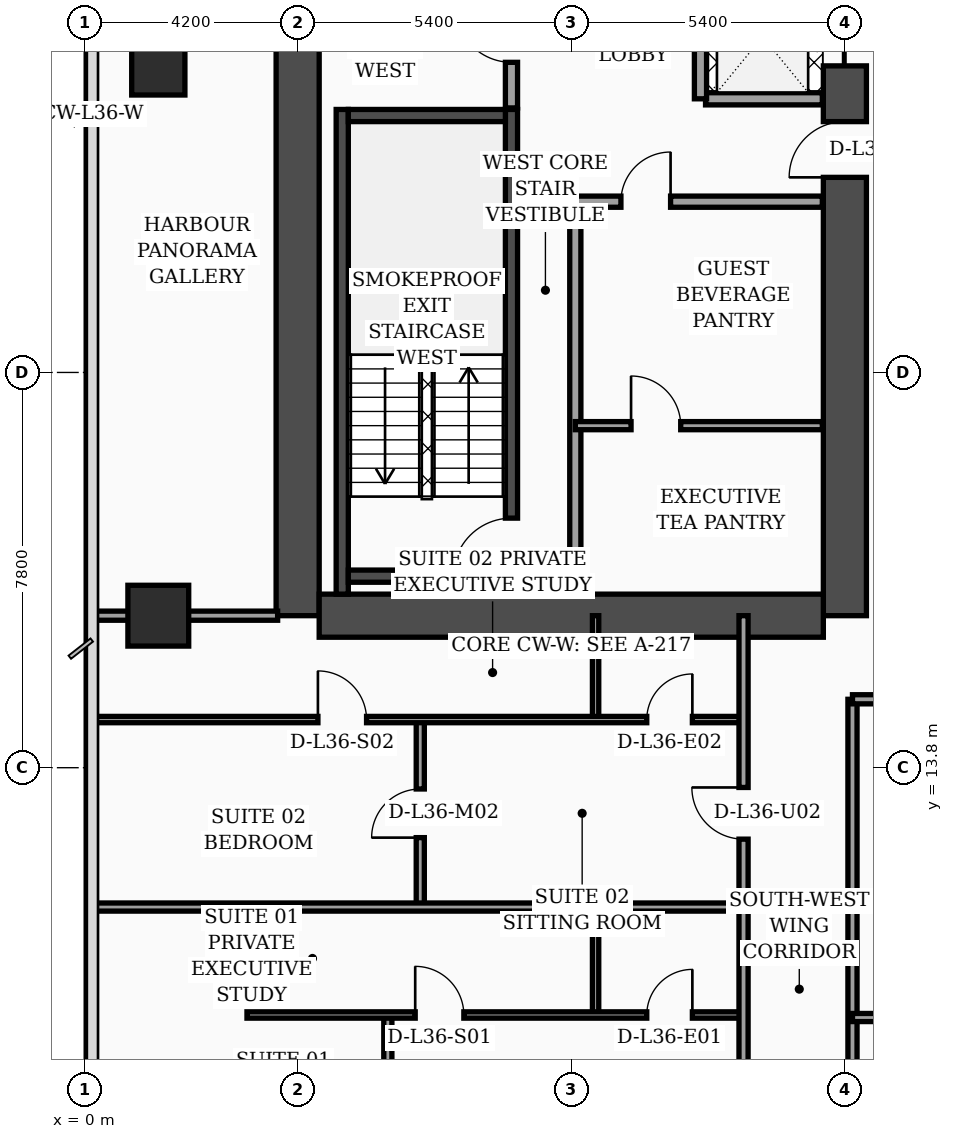
"""IFC4 building model, lengths in metres.
Left out: names, types, materials, properties, quantities, classifications, styles, units other than length and angle.
Written with IfcOpenShell. Run it as: python <this file> out.ifc"""

import sys

from ifc_helpers import new_model, si_unit, direction, frame, frame_2d, origin, origin_2d, place, context, subcontext, project, spatial, rectangle, extrude, element, fill, save


model = new_model("IFC4")
c1 = context("Model", 3, precision=1e-05, world=origin(), true_north=direction((0.0, 1.0)))
c2 = subcontext(c1, "Body", "Model", "MODEL_VIEW")
j1 = project(units=[si_unit("LENGTHUNIT", "METRE"), si_unit("PLANEANGLEUNIT", "RADIAN")], contexts=[c1])
p1 = place(None, origin())
s1 = spatial("IfcSite", under=j1, at=p1, CompositionType="ELEMENT")
p2 = place(p1, origin())
s2 = spatial("IfcBuilding", under=s1, at=p2, CompositionType="ELEMENT")
p3 = place(p2, frame((0.0, 0.0, 148.5)))
s3 = spatial("IfcBuildingStorey", under=s2, at=p3, CompositionType="ELEMENT", Elevation=148.5)
p4 = place(p3, frame((4.2, 16.8, 0.0), z_axis=(0.0, 0.0, 1.0), x_axis=(0.0, 1.0, 0.0)))
e1 = element("IfcWall", 1, at=p4, inside=s3, PredefinedType="SHEAR", context=c2, shape_type="SweptSolid", body=[
    extrude(rectangle(XDim=21.6, YDim=0.85, at=frame_2d((10.8, 0.0))), origin(), (0.0, 0.0, 1.0), 3.56),
])
p5 = place(p3, frame((15.0, 16.8, 0.0), z_axis=(0.0, 0.0, 1.0), x_axis=(0.0, 1.0, 0.0)))
e2 = element("IfcWall", 2, at=p5, inside=s3, PredefinedType="SHEAR", context=c2, shape_type="SweptSolid", body=[
    extrude(rectangle(XDim=21.6, YDim=0.85, at=frame_2d((10.8, 0.0))), origin(), (0.0, 0.0, 1.0), 3.56),
])
p6 = place(p5, frame((8.65, 0.0, 0.0)))
e3 = element("IfcOpeningElement", 3, at=p6, cuts=e2, PredefinedType="OPENING", context=c2, shape_type="SweptSolid", body=[
    extrude(rectangle(XDim=1.1, YDim=2.2, at=frame_2d((0.55, 1.1))), frame((0.0, 0.435, 0.0), z_axis=(0.0, -1.0, 0.0), x_axis=(1.0, 0.0, 0.0)), (0.0, 0.0, 1.0), 0.87),
])
p7 = place(p5, frame((10.85, 0.0, 0.0)))
e4 = element("IfcOpeningElement", 4, at=p7, cuts=e2, PredefinedType="OPENING", context=c2, shape_type="SweptSolid", body=[
    extrude(rectangle(XDim=1.1, YDim=2.2, at=frame_2d((0.55, 1.1))), frame((0.0, 0.435, 0.0), z_axis=(0.0, -1.0, 0.0), x_axis=(1.0, 0.0, 0.0)), (0.0, 0.0, 1.0), 0.87),
])
p8 = place(p5, frame((13.5, 0.0, 0.0)))
e5 = element("IfcOpeningElement", 5, at=p8, cuts=e2, PredefinedType="OPENING", context=c2, shape_type="SweptSolid", body=[
    extrude(rectangle(XDim=1.1, YDim=2.2, at=frame_2d((0.55, 1.1))), frame((0.0, 0.435, 0.0), z_axis=(0.0, -1.0, 0.0), x_axis=(1.0, 0.0, 0.0)), (0.0, 0.0, 1.0), 0.87),
])
p9 = place(p5, frame((16.15, 0.0, 0.0)))
e6 = element("IfcOpeningElement", 6, at=p9, cuts=e2, PredefinedType="OPENING", context=c2, shape_type="SweptSolid", body=[
    extrude(rectangle(XDim=1.1, YDim=2.2, at=frame_2d((0.55, 1.1))), frame((0.0, 0.435, 0.0), z_axis=(0.0, -1.0, 0.0), x_axis=(1.0, 0.0, 0.0)), (0.0, 0.0, 1.0), 0.87),
])
p10 = place(p3, frame((4.625, 16.8, 0.0), z_axis=(0.0, 0.0, 1.0), x_axis=(1.0, 0.0, 0.0)))
e7 = element("IfcWall", 7, at=p10, inside=s3, PredefinedType="SHEAR", context=c2, shape_type="SweptSolid", body=[
    extrude(rectangle(XDim=9.95, YDim=0.85, at=frame_2d((4.975, 0.0))), origin(), (0.0, 0.0, 1.0), 3.56),
])
p11 = place(p3, frame((5.08, 17.225, 0.0), z_axis=(0.0, 0.0, 1.0), x_axis=(0.0, 1.0, 0.0)))
e8 = element("IfcWall", 8, at=p11, inside=s3, PredefinedType="SOLIDWALL", context=c2, shape_type="SweptSolid", body=[
    extrude(rectangle(XDim=9.565, YDim=0.24, at=frame_2d((4.782, 0.0))), origin(), (0.0, 0.0, 1.0), 3.56),
])
p12 = place(p3, frame((8.42, 17.225, 0.0), z_axis=(0.0, 0.0, 1.0), x_axis=(0.0, 1.0, 0.0)))
e9 = element("IfcWall", 9, at=p12, inside=s3, PredefinedType="SOLIDWALL", context=c2, shape_type="SweptSolid", body=[
    extrude(rectangle(XDim=9.565, YDim=0.24, at=frame_2d((4.782, 0.0))), origin(), (0.0, 0.0, 1.0), 3.56),
])
p13 = place(p12, frame((0.35, 0.0, 0.0)))
e10 = element("IfcOpeningElement", 10, at=p13, cuts=e9, PredefinedType="OPENING", context=c2, shape_type="SweptSolid", body=[
    extrude(rectangle(XDim=1.15, YDim=2.2, at=frame_2d((0.575, 1.1))), frame((0.0, 0.13, 0.0), z_axis=(0.0, -1.0, 0.0), x_axis=(1.0, 0.0, 0.0)), (0.0, 0.0, 1.0), 0.26),
])
for number, where, z_axis, x_axis in (
    (11, (5.2, 17.58, 0.0), (0.0, 0.0, 1.0), (1.0, 0.0, 0.0)),
    (12, (5.2, 26.67, 0.0), (0.0, 0.0, 1.0), (1.0, 0.0, 0.0)),
):
    element("IfcWall", number, at=place(p3, frame(where, z_axis=z_axis, x_axis=x_axis)), inside=s3, PredefinedType="SOLIDWALL", context=c2, shape_type="SweptSolid", body=[
        extrude(rectangle(XDim=3.1, YDim=0.24, at=frame_2d((1.55, 0.0))), origin(), (0.0, 0.0, 1.0), 3.56),
    ])
p14 = place(p3, frame((1.45, 16.8, 0.0), z_axis=(0.0, 0.0, 1.0), x_axis=(1.0, 0.0, 0.0)))
e13 = element("IfcColumn", 13, at=p14, inside=s3, PredefinedType="COLUMN", context=c2, shape_type="SweptSolid", body=[
    extrude(rectangle(XDim=1.2, YDim=1.2, at=origin_2d()), origin(), (0.0, 0.0, 1.0), 3.56),
])
p15 = place(p3, frame((1.45, 27.6, 0.0), z_axis=(0.0, 0.0, 1.0), x_axis=(1.0, 0.0, 0.0)))
e14 = element("IfcColumn", 14, at=p15, inside=s3, PredefinedType="COLUMN", context=c2, shape_type="SweptSolid", body=[
    extrude(rectangle(XDim=1.05, YDim=1.05, at=origin_2d()), origin(), (0.0, 0.0, 1.0), 3.56),
])
p16 = place(p3, frame((8.42, 26.82, 0.0), z_axis=(0.0, 0.0, 1.0), x_axis=(0.0, 1.0, 0.0)))
e15 = element("IfcWall", 15, at=p16, inside=s3, PredefinedType="SOLIDWALL", context=c2, shape_type="SweptSolid", body=[
    extrude(rectangle(XDim=3.0, YDim=0.24, at=frame_2d((1.5, 0.0))), origin(), (0.0, 0.0, 1.0), 3.56),
])
p17 = place(p16, frame((0.9, 0.0, 0.0)))
e16 = element("IfcOpeningElement", 16, at=p17, cuts=e15, PredefinedType="OPENING", context=c2, shape_type="SweptSolid", body=[
    extrude(rectangle(XDim=1.1, YDim=2.2, at=frame_2d((0.55, 1.1))), frame((0.0, 0.13, 0.0), z_axis=(0.0, -1.0, 0.0), x_axis=(1.0, 0.0, 0.0)), (0.0, 0.0, 1.0), 0.26),
])
p18 = place(p3, frame((9.68, 17.245, 0.0), z_axis=(0.0, 0.0, 1.0), x_axis=(0.0, 1.0, 0.0)))
e17 = element("IfcWall", 17, at=p18, inside=s3, PredefinedType="SOLIDWALL", context=c2, shape_type="SweptSolid", body=[
    extrude(rectangle(XDim=7.755, YDim=0.22, at=frame_2d((3.877, 0.0))), origin(), (0.0, 0.0, 1.0), 3.56),
])
p19 = place(p3, frame((9.68, 20.55, 0.0), z_axis=(0.0, 0.0, 1.0), x_axis=(1.0, 0.0, 0.0)))
e18 = element("IfcWall", 18, at=p19, inside=s3, PredefinedType="PARTITIONING", context=c2, shape_type="SweptSolid", body=[
    extrude(rectangle(XDim=4.875, YDim=0.16, at=frame_2d((2.438, 0.0))), origin(), (0.0, 0.0, 1.0), 3.56),
])
p20 = place(p19, frame((1.1, 0.0, 0.0)))
e19 = element("IfcOpeningElement", 19, at=p20, cuts=e18, PredefinedType="OPENING", context=c2, shape_type="SweptSolid", body=[
    extrude(rectangle(XDim=0.98, YDim=2.15, at=frame_2d((0.49, 1.075))), frame((0.0, 0.09, 0.0), z_axis=(0.0, -1.0, 0.0), x_axis=(1.0, 0.0, 0.0)), (0.0, 0.0, 1.0), 0.18),
])
p21 = place(p3, frame((9.68, 24.97, 0.0), z_axis=(0.0, 0.0, 1.0), x_axis=(1.0, 0.0, 0.0)))
e20 = element("IfcWall", 20, at=p21, inside=s3, PredefinedType="SOLIDWALL", context=c2, shape_type="SweptSolid", body=[
    extrude(rectangle(XDim=4.875, YDim=0.22, at=frame_2d((2.438, 0.0))), origin(), (0.0, 0.0, 1.0), 2.94),
])
p22 = place(p21, frame((0.9, 0.0, 0.0)))
e21 = element("IfcOpeningElement", 21, at=p22, cuts=e20, PredefinedType="OPENING", context=c2, shape_type="SweptSolid", body=[
    extrude(rectangle(XDim=0.98, YDim=2.15, at=frame_2d((0.49, 1.075))), frame((0.0, 0.12, 0.0), z_axis=(0.0, -1.0, 0.0), x_axis=(1.0, 0.0, 0.0)), (0.0, 0.0, 1.0), 0.24),
])
p23 = place(p3, frame((12.25, 27.0, 0.0), z_axis=(0.0, 0.0, 1.0), x_axis=(1.0, 0.0, 0.0)))
e22 = element("IfcWall", 22, at=p23, inside=s3, PredefinedType="SOLIDWALL", context=c2, shape_type="SweptSolid", body=[
    extrude(rectangle(XDim=2.305, YDim=0.24, at=frame_2d((1.152, 0.0))), origin(), (0.0, 0.0, 1.0), 3.56),
])
p24 = place(p3, frame((12.15, 27.0, 0.0), z_axis=(0.0, 0.0, 1.0), x_axis=(0.0, 1.0, 0.0)))
e23 = element("IfcWall", 23, at=p24, inside=s3, PredefinedType="SOLIDWALL", context=c2, shape_type="SweptSolid", body=[
    extrude(rectangle(XDim=7.75, YDim=0.24, at=frame_2d((3.875, 0.0))), origin(), (0.0, 0.0, 1.0), 3.56),
])
p25 = place(p3, frame((0.08, 16.8, 0.0), z_axis=(0.0, 0.0, 1.0), x_axis=(1.0, 0.0, 0.0)))
e24 = element("IfcWall", 24, at=p25, inside=s3, PredefinedType="PARTITIONING", context=c2, shape_type="SweptSolid", body=[
    extrude(rectangle(XDim=3.725, YDim=0.18, at=frame_2d((1.862, 0.0))), origin(), (0.0, 0.0, 1.0), 2.94),
])
p26 = place(p3, frame((10.08, 8.92, 0.0), z_axis=(0.0, 0.0, 1.0), x_axis=(0.0, 1.0, 0.0)))
e25 = element("IfcWall", 25, at=p26, inside=s3, PredefinedType="PARTITIONING", context=c2, shape_type="SweptSolid", body=[
    extrude(rectangle(XDim=2.13, YDim=0.125, at=frame_2d((1.065, 0.0))), origin(), (0.0, 0.0, 1.0), 3.09),
])
p27 = place(p3, frame((5.98, 2.44, 0.0), z_axis=(0.0, 0.0, 1.0), x_axis=(0.0, 1.0, 0.0)))
e26 = element("IfcWall", 26, at=p27, inside=s3, PredefinedType="PARTITIONING", context=c2, shape_type="SweptSolid", body=[
    extrude(rectangle(XDim=6.48, YDim=0.16, at=frame_2d((3.24, 0.0))), origin(), (0.0, 0.0, 1.0), 3.04),
])
p28 = place(p27, frame((2.76, 0.0, 0.0)))
e27 = element("IfcOpeningElement", 27, at=p28, cuts=e26, PredefinedType="OPENING", context=c2, shape_type="SweptSolid", body=[
    extrude(rectangle(XDim=0.96, YDim=2.2, at=frame_2d((0.48, 1.1))), frame((0.0, 0.09, 0.0), z_axis=(0.0, -1.0, 0.0), x_axis=(1.0, 0.0, 0.0)), (0.0, 0.0, 1.0), 0.18),
])
p29 = place(p3, frame((3.2, 8.92, 0.0), z_axis=(0.0, 0.0, 1.0), x_axis=(1.0, 0.0, 0.0)))
e28 = element("IfcWall", 28, at=p29, inside=s3, PredefinedType="PARTITIONING", context=c2, shape_type="SweptSolid", body=[
    extrude(rectangle(XDim=9.8, YDim=0.125, at=frame_2d((4.9, 0.0))), origin(), (0.0, 0.0, 1.0), 2.94),
])
p30 = place(p29, frame((3.32, 0.0, 0.0)))
e29 = element("IfcOpeningElement", 29, at=p30, cuts=e28, PredefinedType="OPENING", context=c2, shape_type="SweptSolid", body=[
    extrude(rectangle(XDim=0.96, YDim=2.2, at=frame_2d((0.48, 1.1))), frame((0.0, 0.073, 0.0), z_axis=(0.0, -1.0, 0.0), x_axis=(1.0, 0.0, 0.0)), (0.0, 0.0, 1.0), 0.145),
])
p31 = place(p29, frame((7.89, 0.0, 0.0)))
e30 = element("IfcOpeningElement", 30, at=p31, cuts=e28, PredefinedType="OPENING", context=c2, shape_type="SweptSolid", body=[
    extrude(rectangle(XDim=0.9, YDim=2.15, at=frame_2d((0.45, 1.075))), frame((0.0, 0.073, 0.0), z_axis=(0.0, -1.0, 0.0), x_axis=(1.0, 0.0, 0.0)), (0.0, 0.0, 1.0), 0.145),
])
p32 = place(p3, frame((10.08, 14.75, 0.0), z_axis=(0.0, 0.0, 1.0), x_axis=(0.0, 1.0, 0.0)))
e31 = element("IfcWall", 31, at=p32, inside=s3, PredefinedType="PARTITIONING", context=c2, shape_type="SweptSolid", body=[
    extrude(rectangle(XDim=2.05, YDim=0.125, at=frame_2d((1.025, 0.0))), origin(), (0.0, 0.0, 1.0), 3.56),
])
p33 = place(p3, frame((6.62, 11.05, 0.0), z_axis=(0.0, 0.0, 1.0), x_axis=(0.0, 1.0, 0.0)))
e32 = element("IfcWall", 32, at=p33, inside=s3, PredefinedType="PARTITIONING", context=c2, shape_type="SweptSolid", body=[
    extrude(rectangle(XDim=3.7, YDim=0.16, at=frame_2d((1.85, 0.0))), origin(), (0.0, 0.0, 1.0), 3.56),
])
p34 = place(p33, frame((1.37, 0.0, 0.0)))
e33 = element("IfcOpeningElement", 33, at=p34, cuts=e32, PredefinedType="OPENING", context=c2, shape_type="SweptSolid", body=[
    extrude(rectangle(XDim=0.96, YDim=2.2, at=frame_2d((0.48, 1.1))), frame((0.0, 0.09, 0.0), z_axis=(0.0, -1.0, 0.0), x_axis=(1.0, 0.0, 0.0)), (0.0, 0.0, 1.0), 0.18),
])
p35 = place(p3, frame((0.08, 14.75, 0.0), z_axis=(0.0, 0.0, 1.0), x_axis=(1.0, 0.0, 0.0)))
e34 = element("IfcWall", 34, at=p35, inside=s3, PredefinedType="PARTITIONING", context=c2, shape_type="SweptSolid", body=[
    extrude(rectangle(XDim=12.92, YDim=0.125, at=frame_2d((6.46, 0.0))), origin(), (0.0, 0.0, 1.0), 2.94),
])
p36 = place(p35, frame((4.52, 0.0, 0.0)))
e35 = element("IfcOpeningElement", 35, at=p36, cuts=e34, PredefinedType="OPENING", context=c2, shape_type="SweptSolid", body=[
    extrude(rectangle(XDim=0.96, YDim=2.2, at=frame_2d((0.48, 1.1))), frame((0.0, 0.073, 0.0), z_axis=(0.0, -1.0, 0.0), x_axis=(1.0, 0.0, 0.0)), (0.0, 0.0, 1.0), 0.145),
])
p37 = place(p35, frame((11.01, 0.0, 0.0)))
e36 = element("IfcOpeningElement", 36, at=p37, cuts=e34, PredefinedType="OPENING", context=c2, shape_type="SweptSolid", body=[
    extrude(rectangle(XDim=0.9, YDim=2.15, at=frame_2d((0.45, 1.075))), frame((0.0, 0.073, 0.0), z_axis=(0.0, -1.0, 0.0), x_axis=(1.0, 0.0, 0.0)), (0.0, 0.0, 1.0), 0.145),
])
p38 = place(p3, frame((0.08, 11.05, 0.0), z_axis=(0.0, 0.0, 1.0), x_axis=(1.0, 0.0, 0.0)))
e37 = element("IfcWall", 37, at=p38, inside=s3, PredefinedType="PARTITIONING", context=c2, shape_type="SweptSolid", body=[
    extrude(rectangle(XDim=12.92, YDim=0.16, at=frame_2d((6.46, 0.0))), origin(), (0.0, 0.0, 1.0), 2.94),
])
p39 = place(p3, frame((13.0, 2.44, 0.0), z_axis=(0.0, 0.0, 1.0), x_axis=(0.0, 1.0, 0.0)))
e38 = element("IfcWall", 38, at=p39, inside=s3, PredefinedType="PARTITIONING", context=c2, shape_type="SweptSolid", body=[
    extrude(rectangle(XDim=14.36, YDim=0.18, at=frame_2d((7.18, 0.0))), origin(), (0.0, 0.0, 1.0), 2.94),
])
p40 = place(p39, frame((3.01, 0.0, 0.0)))
e39 = element("IfcOpeningElement", 39, at=p40, cuts=e38, PredefinedType="OPENING", context=c2, shape_type="SweptSolid", body=[
    extrude(rectangle(XDim=1.02, YDim=2.2, at=frame_2d((0.51, 1.1))), frame((0.0, 0.1, 0.0), z_axis=(0.0, -1.0, 0.0), x_axis=(1.0, 0.0, 0.0)), (0.0, 0.0, 1.0), 0.2),
])
p41 = place(p39, frame((9.95, 0.0, 0.0)))
e40 = element("IfcOpeningElement", 40, at=p41, cuts=e38, PredefinedType="OPENING", context=c2, shape_type="SweptSolid", body=[
    extrude(rectangle(XDim=1.02, YDim=2.2, at=frame_2d((0.51, 1.1))), frame((0.0, 0.1, 0.0), z_axis=(0.0, -1.0, 0.0), x_axis=(1.0, 0.0, 0.0)), (0.0, 0.0, 1.0), 0.2),
])
p42 = place(p3, frame((15.15, 2.44, 0.0), z_axis=(0.0, 0.0, 1.0), x_axis=(0.0, 1.0, 0.0)))
e41 = element("IfcWall", 41, at=p42, inside=s3, PredefinedType="PARTITIONING", context=c2, shape_type="SweptSolid", body=[
    extrude(rectangle(XDim=12.71, YDim=0.18, at=frame_2d((6.355, 0.0))), origin(), (0.0, 0.0, 1.0), 3.04),
])
p43 = place(p3, frame((15.15, 8.87, 0.0), z_axis=(0.0, 0.0, 1.0), x_axis=(1.0, 0.0, 0.0)))
e42 = element("IfcWall", 42, at=p43, inside=s3, PredefinedType="PARTITIONING", context=c2, shape_type="SweptSolid", body=[
    extrude(rectangle(XDim=4.45, YDim=0.16, at=frame_2d((2.225, 0.0))), origin(), (0.0, 0.0, 1.0), 3.56),
])
p44 = place(p43, frame((1.75, 0.0, 0.0)))
e43 = element("IfcOpeningElement", 43, at=p44, cuts=e42, PredefinedType="OPENING", context=c2, shape_type="SweptSolid", body=[
    extrude(rectangle(XDim=0.96, YDim=2.2, at=frame_2d((0.48, 1.1))), frame((0.0, 0.09, 0.0), z_axis=(0.0, -1.0, 0.0), x_axis=(1.0, 0.0, 0.0)), (0.0, 0.0, 1.0), 0.18),
])
p45 = place(p3, frame((15.15, 15.15, 0.0), z_axis=(0.0, 0.0, 1.0), x_axis=(1.0, 0.0, 0.0)))
e44 = element("IfcWall", 44, at=p45, inside=s3, PredefinedType="PARTITIONING", context=c2, shape_type="SweptSolid", body=[
    extrude(rectangle(XDim=6.45, YDim=0.18, at=frame_2d((3.225, 0.0))), origin(), (0.0, 0.0, 1.0), 2.49),
])
p46 = place(p45, frame((1.74, 0.0, 0.0)))
e45 = element("IfcOpeningElement", 45, at=p46, cuts=e44, PredefinedType="OPENING", context=c2, shape_type="SweptSolid", body=[
    extrude(rectangle(XDim=1.02, YDim=2.2, at=frame_2d((0.51, 1.1))), frame((0.0, 0.1, 0.0), z_axis=(0.0, -1.0, 0.0), x_axis=(1.0, 0.0, 0.0)), (0.0, 0.0, 1.0), 0.2),
])
p47 = place(p17, origin())
e46 = element("IfcDoor", 46, at=p47, inside=s3, OperationType="SINGLE_SWING_RIGHT", PredefinedType="DOOR", context=c2, shape_type="SweptSolid", body=[
    extrude(rectangle(XDim=1.1, YDim=2.2, at=frame_2d((0.55, 1.1))), frame((0.0, 0.025, 0.0), z_axis=(0.0, -1.0, 0.0), x_axis=(1.0, 0.0, 0.0)), (0.0, 0.0, 1.0), 0.05),
])
fill(e16, e46)
p48 = place(p20, origin())
e47 = element("IfcDoor", 47, at=p48, inside=s3, OperationType="SINGLE_SWING_LEFT", PredefinedType="DOOR", context=c2, shape_type="SweptSolid", body=[
    extrude(rectangle(XDim=0.98, YDim=2.15, at=frame_2d((0.49, 1.075))), frame((0.0, 0.025, 0.0), z_axis=(0.0, -1.0, 0.0), x_axis=(1.0, 0.0, 0.0)), (0.0, 0.0, 1.0), 0.05),
])
fill(e19, e47)
p49 = place(p22, origin())
e48 = element("IfcDoor", 48, at=p49, inside=s3, OperationType="SINGLE_SWING_RIGHT", PredefinedType="DOOR", context=c2, shape_type="SweptSolid", body=[
    extrude(rectangle(XDim=0.98, YDim=2.15, at=frame_2d((0.49, 1.075))), frame((0.0, 0.025, 0.0), z_axis=(0.0, -1.0, 0.0), x_axis=(1.0, 0.0, 0.0)), (0.0, 0.0, 1.0), 0.05),
])
fill(e21, e48)
p50 = place(p30, origin())
e49 = element("IfcDoor", 49, at=p50, inside=s3, OperationType="SINGLE_SWING_LEFT", PredefinedType="DOOR", context=c2, shape_type="SweptSolid", body=[
    extrude(rectangle(XDim=0.96, YDim=2.2, at=frame_2d((0.48, 1.1))), frame((0.0, 0.025, 0.0), z_axis=(0.0, -1.0, 0.0), x_axis=(1.0, 0.0, 0.0)), (0.0, 0.0, 1.0), 0.05),
])
fill(e29, e49)
p51 = place(p31, origin())
e50 = element("IfcDoor", 50, at=p51, inside=s3, OperationType="SINGLE_SWING_RIGHT", PredefinedType="DOOR", context=c2, shape_type="SweptSolid", body=[
    extrude(rectangle(XDim=0.9, YDim=2.15, at=frame_2d((0.45, 1.075))), frame((0.0, 0.025, 0.0), z_axis=(0.0, -1.0, 0.0), x_axis=(1.0, 0.0, 0.0)), (0.0, 0.0, 1.0), 0.05),
])
fill(e30, e50)
p52 = place(p34, origin())
e51 = element("IfcDoor", 51, at=p52, inside=s3, OperationType="SINGLE_SWING_LEFT", PredefinedType="DOOR", context=c2, shape_type="SweptSolid", body=[
    extrude(rectangle(XDim=0.96, YDim=2.2, at=frame_2d((0.48, 1.1))), frame((0.0, 0.025, 0.0), z_axis=(0.0, -1.0, 0.0), x_axis=(1.0, 0.0, 0.0)), (0.0, 0.0, 1.0), 0.05),
])
fill(e33, e51)
p53 = place(p36, origin())
e52 = element("IfcDoor", 52, at=p53, inside=s3, OperationType="SINGLE_SWING_LEFT", PredefinedType="DOOR", context=c2, shape_type="SweptSolid", body=[
    extrude(rectangle(XDim=0.96, YDim=2.2, at=frame_2d((0.48, 1.1))), frame((0.0, 0.025, 0.0), z_axis=(0.0, -1.0, 0.0), x_axis=(1.0, 0.0, 0.0)), (0.0, 0.0, 1.0), 0.05),
])
fill(e35, e52)
p54 = place(p37, origin())
e53 = element("IfcDoor", 53, at=p54, inside=s3, OperationType="SINGLE_SWING_RIGHT", PredefinedType="DOOR", context=c2, shape_type="SweptSolid", body=[
    extrude(rectangle(XDim=0.9, YDim=2.15, at=frame_2d((0.45, 1.075))), frame((0.0, 0.025, 0.0), z_axis=(0.0, -1.0, 0.0), x_axis=(1.0, 0.0, 0.0)), (0.0, 0.0, 1.0), 0.05),
])
fill(e36, e53)
p55 = place(p41, origin())
e54 = element("IfcDoor", 54, at=p55, inside=s3, OperationType="SINGLE_SWING_RIGHT", PredefinedType="DOOR", context=c2, shape_type="SweptSolid", body=[
    extrude(rectangle(XDim=1.02, YDim=2.2, at=frame_2d((0.51, 1.1))), frame((0.0, 0.025, 0.0), z_axis=(0.0, -1.0, 0.0), x_axis=(1.0, 0.0, 0.0)), (0.0, 0.0, 1.0), 0.05),
])
fill(e40, e54)
p56 = place(p13, origin())
e55 = element("IfcDoor", 55, at=p56, inside=s3, OperationType="SINGLE_SWING_LEFT", PredefinedType="DOOR", context=c2, shape_type="SweptSolid", body=[
    extrude(rectangle(XDim=1.15, YDim=2.2, at=frame_2d((0.575, 1.1))), frame((0.0, 0.025, 0.0), z_axis=(0.0, -1.0, 0.0), x_axis=(1.0, 0.0, 0.0)), (0.0, 0.0, 1.0), 0.05),
])
fill(e10, e55)
p57 = place(p6, origin())
e56 = element("IfcDoor", 56, at=p57, inside=s3, OperationType="SINGLE_SWING_LEFT", PredefinedType="DOOR", context=c2, shape_type="SweptSolid", body=[
    extrude(rectangle(XDim=1.1, YDim=2.2, at=frame_2d((0.55, 1.1))), frame((0.0, 0.025, 0.0), z_axis=(0.0, -1.0, 0.0), x_axis=(1.0, 0.0, 0.0)), (0.0, 0.0, 1.0), 0.05),
])
fill(e3, e56)
p58 = place(p7, origin())
e57 = element("IfcDoor", 57, at=p58, inside=s3, OperationType="DOUBLE_DOOR_SLIDING", PredefinedType="DOOR", context=c2, shape_type="SweptSolid", body=[
    extrude(rectangle(XDim=1.1, YDim=2.2, at=frame_2d((0.55, 1.1))), frame((0.0, 0.025, 0.0), z_axis=(0.0, -1.0, 0.0), x_axis=(1.0, 0.0, 0.0)), (0.0, 0.0, 1.0), 0.05),
])
fill(e4, e57)
save(model, sys.argv[1])
